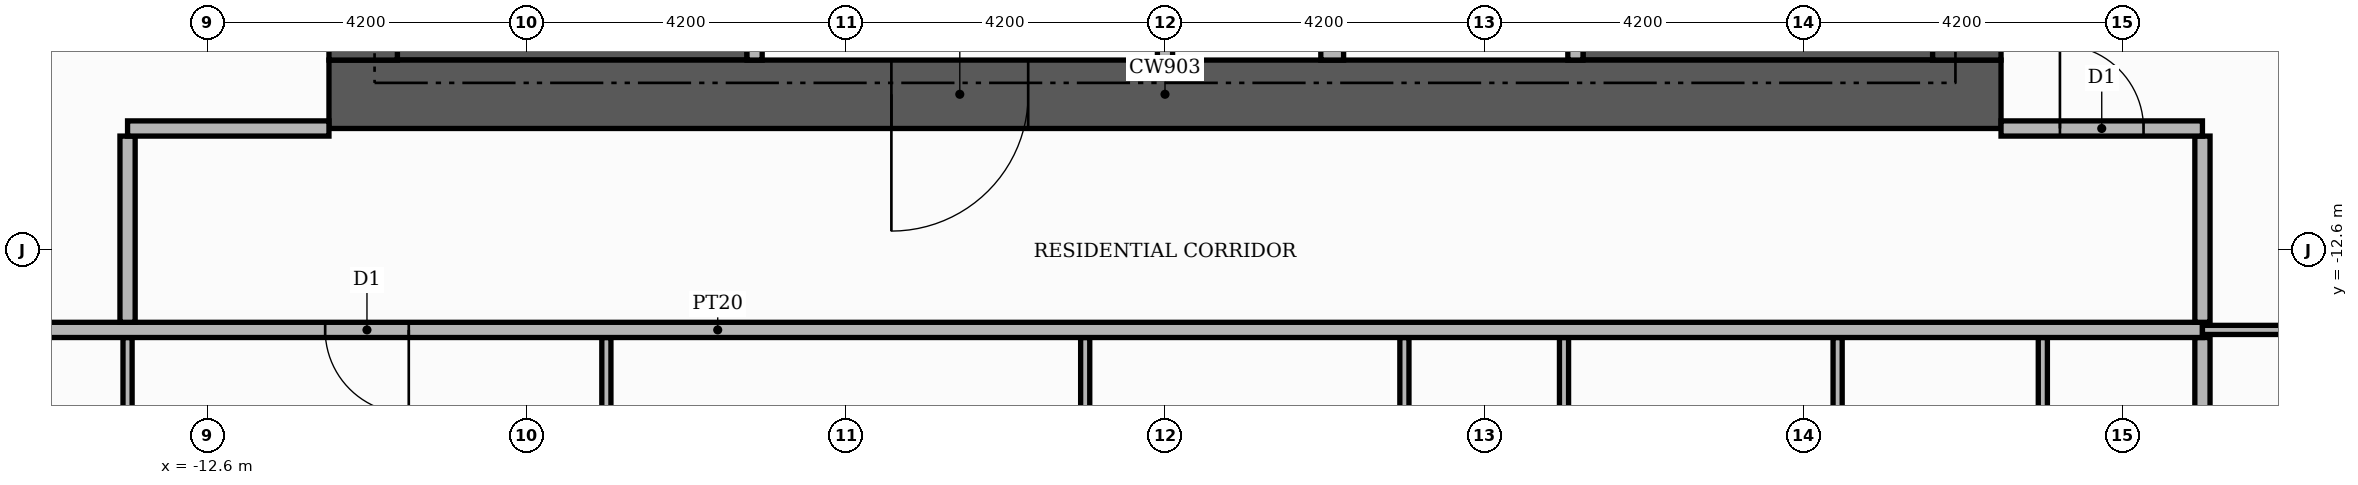
"""IFC4 building model, lengths in metres.
Left out: names, types, materials, properties, quantities, classifications, styles, units other than length and angle.
Written with IfcOpenShell. Run it as: python <this file> out.ifc"""

import sys

from ifc_helpers import new_model, si_unit, direction, frame, frame_2d, origin, place, context, subcontext, project, spatial, rectangle, extrude, element, fill, save


model = new_model("IFC4")
c1 = context("Model", 3, precision=1e-05, world=origin(), true_north=direction((0.0, 1.0)))
c2 = subcontext(c1, "Body", "Model", "MODEL_VIEW")
j1 = project(units=[si_unit("LENGTHUNIT", "METRE"), si_unit("PLANEANGLEUNIT", "RADIAN")], contexts=[c1])
p1 = place(None, origin())
s1 = spatial("IfcSite", under=j1, at=p1, CompositionType="ELEMENT")
p2 = place(p1, origin())
s2 = spatial("IfcBuilding", under=s1, at=p2, CompositionType="ELEMENT")
p3 = place(p2, frame((0.0, 0.0, 153.3)))
s3 = spatial("IfcBuildingStorey", under=s2, at=p3, CompositionType="ELEMENT", Elevation=153.3)
for number, where, z_axis, x_axis in (
    (1, (-10.1, -9.15, 0.0), (0.0, 0.0, 1.0), (1.0, 0.0, 0.0)),
    (2, (5.5, -9.15, 0.0), (0.0, 0.0, 1.0), (1.0, 0.0, 0.0)),
):
    element("IfcWall", number, at=place(p3, frame(where, z_axis=z_axis, x_axis=x_axis)), inside=s3, PredefinedType="SHEAR", context=c2, shape_type="SweptSolid", body=[
        extrude(rectangle(XDim=4.6, YDim=1.9, at=frame_2d((2.3, 0.0))), origin(), (0.0, 0.0, 1.0), 3.48),
    ])
p4 = place(p3, frame((-11.0, -10.55, 0.0), z_axis=(0.0, 0.0, 1.0), x_axis=(1.0, 0.0, 0.0)))
e3 = element("IfcWall", 3, at=p4, inside=s3, PredefinedType="SHEAR", context=c2, shape_type="SweptSolid", body=[
    extrude(rectangle(XDim=22.0, YDim=0.9, at=frame_2d((11.0, 0.0))), origin(), (0.0, 0.0, 1.0), 3.48),
])
p5 = place(p4, frame((7.4, 0.0, 0.0)))
e4 = element("IfcOpeningElement", 4, at=p5, cuts=e3, PredefinedType="OPENING", context=c2, shape_type="SweptSolid", body=[
    extrude(rectangle(XDim=1.8, YDim=2.2, at=frame_2d((0.9, 1.1))), frame((0.0, 0.46, 0.0), z_axis=(0.0, -1.0, 0.0), x_axis=(1.0, 0.0, 0.0)), (0.0, 0.0, 1.0), 0.92),
])
for number, where, z_axis, x_axis in (
    (5, (-10.55, -10.1, 0.0), (0.0, 0.0, 1.0), (0.0, 1.0, 0.0)),
    (6, (10.55, -10.1, 0.0), (0.0, 0.0, 1.0), (0.0, 1.0, 0.0)),
):
    element("IfcWall", number, at=place(p3, frame(where, z_axis=z_axis, x_axis=x_axis)), inside=s3, PredefinedType="SHEAR", context=c2, shape_type="SweptSolid", body=[
        extrude(rectangle(XDim=20.2, YDim=0.9, at=frame_2d((10.1, 0.0))), origin(), (0.0, 0.0, 1.0), 3.48),
    ])
p6 = place(p3, frame((-5.4, -10.1, 0.0), z_axis=(0.0, 0.0, 1.0), x_axis=(0.0, 1.0, 0.0)))
e7 = element("IfcWall", 7, at=p6, inside=s3, PredefinedType="PARTITIONING", context=c2, shape_type="SweptSolid", body=[
    extrude(rectangle(XDim=4.6, YDim=0.2, at=frame_2d((2.3, 0.0))), origin(), (0.0, 0.0, 1.0), 3.48),
])
p7 = place(p6, frame((2.9, 0.0, 0.0)))
e8 = element("IfcOpeningElement", 8, at=p7, cuts=e7, PredefinedType="OPENING", context=c2, shape_type="SweptSolid", body=[
    extrude(rectangle(XDim=1.0, YDim=2.1, at=frame_2d((0.5, 1.05))), frame((0.0, 0.11, 0.0), z_axis=(0.0, -1.0, 0.0), x_axis=(1.0, 0.0, 0.0)), (0.0, 0.0, 1.0), 0.22),
])
p8 = place(p3, frame((0.0, -10.1, 0.0), z_axis=(0.0, 0.0, 1.0), x_axis=(0.0, 1.0, 0.0)))
e9 = element("IfcWall", 9, at=p8, inside=s3, PredefinedType="PARTITIONING", context=c2, shape_type="SweptSolid", body=[
    extrude(rectangle(XDim=2.2, YDim=0.2, at=frame_2d((1.1, 0.0))), origin(), (0.0, 0.0, 1.0), 3.48),
])
p9 = place(p3, frame((2.2, -10.1, 0.0), z_axis=(0.0, 0.0, 1.0), x_axis=(0.0, 1.0, 0.0)))
e10 = element("IfcWall", 10, at=p9, inside=s3, PredefinedType="PARTITIONING", context=c2, shape_type="SweptSolid", body=[
    extrude(rectangle(XDim=2.2, YDim=0.3, at=frame_2d((1.1, 0.0))), origin(), (0.0, 0.0, 1.0), 3.48),
])
p10 = place(p3, frame((5.4, -10.1, 0.0), z_axis=(0.0, 0.0, 1.0), x_axis=(0.0, 1.0, 0.0)))
e11 = element("IfcWall", 11, at=p10, inside=s3, PredefinedType="PARTITIONING", context=c2, shape_type="SweptSolid", body=[
    extrude(rectangle(XDim=4.6, YDim=0.2, at=frame_2d((2.3, 0.0))), origin(), (0.0, 0.0, 1.0), 3.48),
])
p11 = place(p10, frame((2.9, 0.0, 0.0)))
e12 = element("IfcOpeningElement", 12, at=p11, cuts=e11, PredefinedType="OPENING", context=c2, shape_type="SweptSolid", body=[
    extrude(rectangle(XDim=1.0, YDim=2.1, at=frame_2d((0.5, 1.05))), frame((0.0, 0.11, 0.0), z_axis=(0.0, -1.0, 0.0), x_axis=(1.0, 0.0, 0.0)), (0.0, 0.0, 1.0), 0.22),
])
p12 = place(p3, frame((13.65, -25.42, 0.0), z_axis=(0.0, 0.0, 1.0), x_axis=(0.0, 1.0, 0.0)))
e13 = element("IfcWall", 13, at=p12, inside=s3, PredefinedType="PARTITIONING", context=c2, shape_type="SweptSolid", body=[
    extrude(rectangle(XDim=11.67, YDim=0.2, at=frame_2d((5.835, 0.0))), origin(), (0.0, 0.0, 1.0), 3.48),
])
p13 = place(p3, frame((-13.65, -20.66, 0.0), z_axis=(0.0, 0.0, 1.0), x_axis=(0.0, 1.0, 0.0)))
e14 = element("IfcWall", 14, at=p13, inside=s3, PredefinedType="PARTITIONING", context=c2, shape_type="SweptSolid", body=[
    extrude(rectangle(XDim=6.91, YDim=0.12, at=frame_2d((3.455, 0.0))), origin(), (0.0, 0.0, 1.0), 3.48),
])
p14 = place(p13, frame((3.025, 0.0, 0.0)))
e15 = element("IfcOpeningElement", 15, at=p14, cuts=e14, PredefinedType="OPENING", context=c2, shape_type="SweptSolid", body=[
    extrude(rectangle(XDim=0.9, YDim=2.1, at=frame_2d((0.45, 1.05))), frame((0.0, 0.07, 0.0), z_axis=(0.0, -1.0, 0.0), x_axis=(1.0, 0.0, 0.0)), (0.0, 0.0, 1.0), 0.14),
])
for number, where, z_axis, x_axis in (
    (16, (-7.35, -19.16, 0.0), (0.0, 0.0, 1.0), (0.0, 1.0, 0.0)),
    (17, (-1.05, -19.16, 0.0), (0.0, 0.0, 1.0), (0.0, 1.0, 0.0)),
    (18, (3.15, -19.16, 0.0), (0.0, 0.0, 1.0), (0.0, 1.0, 0.0)),
    (19, (5.25, -19.16, 0.0), (0.0, 0.0, 1.0), (0.0, 1.0, 0.0)),
    (20, (8.85, -19.16, 0.0), (0.0, 0.0, 1.0), (0.0, 1.0, 0.0)),
    (21, (11.55, -19.16, 0.0), (0.0, 0.0, 1.0), (0.0, 1.0, 0.0)),
):
    element("IfcWall", number, at=place(p3, frame(where, z_axis=z_axis, x_axis=x_axis)), inside=s3, PredefinedType="PARTITIONING", context=c2, shape_type="SweptSolid", body=[
        extrude(rectangle(XDim=5.41, YDim=0.12, at=frame_2d((2.705, 0.0))), origin(), (0.0, 0.0, 1.0), 3.48),
    ])
p15 = place(p3, frame((-25.42, -13.65, 0.0), z_axis=(0.0, 0.0, 1.0), x_axis=(1.0, 0.0, 0.0)))
e22 = element("IfcWall", 22, at=p15, inside=s3, PredefinedType="PARTITIONING", context=c2, shape_type="SweptSolid", body=[
    extrude(rectangle(XDim=39.07, YDim=0.2, at=frame_2d((19.535, 0.0))), origin(), (0.0, 0.0, 1.0), 3.48),
])
p16 = place(p15, frame((14.37, 0.0, 0.0)))
e23 = element("IfcOpeningElement", 23, at=p16, cuts=e22, PredefinedType="OPENING", context=c2, shape_type="SweptSolid", body=[
    extrude(rectangle(XDim=1.1, YDim=2.4, at=frame_2d((0.55, 1.2))), frame((0.0, 0.11, 0.0), z_axis=(0.0, -1.0, 0.0), x_axis=(1.0, 0.0, 0.0)), (0.0, 0.0, 1.0), 0.22),
])
p17 = place(p3, frame((13.65, -13.65, 0.0), z_axis=(0.0, 0.0, 1.0), x_axis=(1.0, 0.0, 0.0)))
e24 = element("IfcWall", 24, at=p17, inside=s3, PredefinedType="PARTITIONING", context=c2, shape_type="SweptSolid", body=[
    extrude(rectangle(XDim=6.17, YDim=0.12, at=frame_2d((3.085, 0.0))), origin(), (0.0, 0.0, 1.0), 3.48),
])
p18 = place(p17, frame((2.635, 0.0, 0.0)))
e25 = element("IfcOpeningElement", 25, at=p18, cuts=e24, PredefinedType="OPENING", context=c2, shape_type="SweptSolid", body=[
    extrude(rectangle(XDim=0.9, YDim=2.1, at=frame_2d((0.45, 1.05))), frame((0.0, 0.07, 0.0), z_axis=(0.0, -1.0, 0.0), x_axis=(1.0, 0.0, 0.0)), (0.0, 0.0, 1.0), 0.14),
])
for number, where, z_axis, x_axis in (
    (26, (-13.65, -13.55, 0.0), (0.0, 0.0, 1.0), (0.0, 1.0, 0.0)),
    (27, (13.65, -13.55, 0.0), (0.0, 0.0, 1.0), (0.0, 1.0, 0.0)),
):
    element("IfcWall", number, at=place(p3, frame(where, z_axis=z_axis, x_axis=x_axis)), inside=s3, PredefinedType="PARTITIONING", context=c2, shape_type="SweptSolid", body=[
        extrude(rectangle(XDim=2.45, YDim=0.2, at=frame_2d((1.225, 0.0))), origin(), (0.0, 0.0, 1.0), 3.48),
    ])
p19 = place(p3, frame((-13.65, -11.0, 0.0), z_axis=(0.0, 0.0, 1.0), x_axis=(1.0, 0.0, 0.0)))
e28 = element("IfcWall", 28, at=p19, inside=s3, PredefinedType="PARTITIONING", context=c2, shape_type="SweptSolid", body=[
    extrude(rectangle(XDim=2.65, YDim=0.2, at=frame_2d((1.325, 0.0))), origin(), (0.0, 0.0, 1.0), 3.48),
])
p20 = place(p3, frame((11.0, -11.0, 0.0), z_axis=(0.0, 0.0, 1.0), x_axis=(1.0, 0.0, 0.0)))
e29 = element("IfcWall", 29, at=p20, inside=s3, PredefinedType="PARTITIONING", context=c2, shape_type="SweptSolid", body=[
    extrude(rectangle(XDim=2.65, YDim=0.2, at=frame_2d((1.325, 0.0))), origin(), (0.0, 0.0, 1.0), 3.48),
])
p21 = place(p20, frame((0.775, 0.0, 0.0)))
e30 = element("IfcOpeningElement", 30, at=p21, cuts=e29, PredefinedType="OPENING", context=c2, shape_type="SweptSolid", body=[
    extrude(rectangle(XDim=1.1, YDim=2.4, at=frame_2d((0.55, 1.2))), frame((0.0, 0.11, 0.0), z_axis=(0.0, -1.0, 0.0), x_axis=(1.0, 0.0, 0.0)), (0.0, 0.0, 1.0), 0.22),
])
p22 = place(p5, frame((1.8, 0.0, 0.0), z_axis=(0.0, 0.0, 1.0), x_axis=(-1.0, 0.0, 0.0)))
e31 = element("IfcDoor", 31, at=p22, inside=s3, OperationType="DOUBLE_DOOR_SINGLE_SWING", PredefinedType="DOOR", context=c2, shape_type="SweptSolid", body=[
    extrude(rectangle(XDim=1.8, YDim=2.2, at=frame_2d((0.9, 1.1))), frame((0.0, 0.025, 0.0), z_axis=(0.0, -1.0, 0.0), x_axis=(1.0, 0.0, 0.0)), (0.0, 0.0, 1.0), 0.05),
])
fill(e4, e31)
p23 = place(p16, frame((1.1, 0.0, 0.0), z_axis=(0.0, 0.0, 1.0), x_axis=(-1.0, 0.0, 0.0)))
e32 = element("IfcDoor", 32, at=p23, inside=s3, OperationType="SINGLE_SWING_RIGHT", PredefinedType="DOOR", context=c2, shape_type="SweptSolid", body=[
    extrude(rectangle(XDim=1.1, YDim=2.4, at=frame_2d((0.55, 1.2))), frame((0.0, 0.025, 0.0), z_axis=(0.0, -1.0, 0.0), x_axis=(1.0, 0.0, 0.0)), (0.0, 0.0, 1.0), 0.05),
])
fill(e23, e32)
p24 = place(p21, origin())
e33 = element("IfcDoor", 33, at=p24, inside=s3, OperationType="SINGLE_SWING_LEFT", PredefinedType="DOOR", context=c2, shape_type="SweptSolid", body=[
    extrude(rectangle(XDim=1.1, YDim=2.4, at=frame_2d((0.55, 1.2))), frame((0.0, 0.025, 0.0), z_axis=(0.0, -1.0, 0.0), x_axis=(1.0, 0.0, 0.0)), (0.0, 0.0, 1.0), 0.05),
])
fill(e30, e33)
save(model, sys.argv[1])
